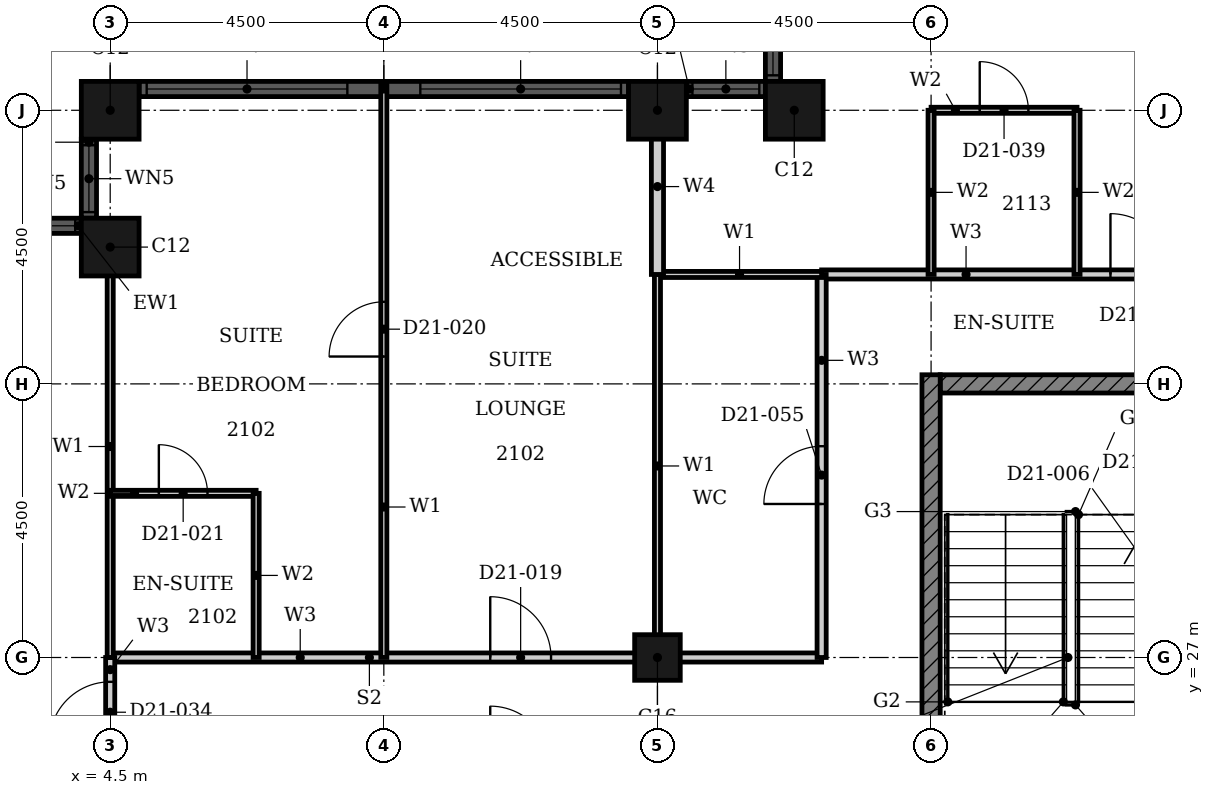
"""IFC4 building model, lengths in metres.
Left out: names, types, materials, properties, quantities, classifications, styles, units other than length and angle.
Written with IfcOpenShell. Run it as: python <this file> out.ifc"""

import sys

from ifc_helpers import new_model, si_unit, direction, frame, frame_2d, origin, origin_2d, place, context, subcontext, project, spatial, rectangle, hollow_rectangle, extrude, element, fill, save


model = new_model("IFC4")
c1 = context("Model", 3, precision=1e-05, world=origin(), true_north=direction((0.0, 1.0)))
c2 = subcontext(c1, "Body", "Model", "MODEL_VIEW")
j1 = project(units=[si_unit("LENGTHUNIT", "METRE"), si_unit("PLANEANGLEUNIT", "RADIAN")], contexts=[c1])
p1 = place(None, origin())
s1 = spatial("IfcSite", under=j1, at=p1, CompositionType="ELEMENT")
p2 = place(p1, origin())
s2 = spatial("IfcBuilding", under=s1, at=p2, CompositionType="ELEMENT")
p3 = place(p2, frame((0.0, 0.0, 88.8)))
s3 = spatial("IfcBuildingStorey", under=s2, at=p3, CompositionType="ELEMENT", Elevation=88.8)
for number, where, z_axis, x_axis in (
    (1, (15.75, 36.0, 0.0), (0.0, 0.0, 1.0), (1.0, 0.0, 0.0)),
    (2, (13.5, 36.0, 0.0), (0.0, 0.0, 1.0), (1.0, 0.0, 0.0)),
    (3, (4.5, 36.0, 0.0), (0.0, 0.0, 1.0), (1.0, 0.0, 0.0)),
    (4, (4.5, 33.75, 0.0), (0.0, 0.0, 1.0), (1.0, 0.0, 0.0)),
):
    element("IfcColumn", number, at=place(p3, frame(where, z_axis=z_axis, x_axis=x_axis)), inside=s3, PredefinedType="COLUMN", context=c2, shape_type="SweptSolid", body=[
        extrude(hollow_rectangle(XDim=0.95, YDim=0.95, WallThickness=0.03, at=origin_2d()), origin(), (0.0, 0.0, 1.0), 3.6),
    ])
p4 = place(p3, frame((13.5, 27.0, 0.0), z_axis=(0.0, 0.0, 1.0), x_axis=(1.0, 0.0, 0.0)))
e5 = element("IfcColumn", 5, at=p4, inside=s3, PredefinedType="COLUMN", context=c2, shape_type="SweptSolid", body=[
    extrude(hollow_rectangle(XDim=0.75, YDim=0.75, WallThickness=0.024, at=origin_2d()), origin(), (0.0, 0.0, 1.0), 3.6),
])
p5 = place(p3, frame((15.4, 37.775, 0.0), z_axis=(0.0, 0.0, 1.0), x_axis=(0.0, -1.0, 0.0)))
e6 = element("IfcWall", 6, at=p5, inside=s3, PredefinedType="SOLIDWALL", context=c2, shape_type="SweptSolid", body=[
    extrude(rectangle(XDim=1.3, YDim=0.25, at=frame_2d((0.65, 0.0))), origin(), (0.0, 0.0, 1.0), 3.6),
])
p6 = place(p5, frame((0.1, 0.0, 0.9)))
e7 = element("IfcOpeningElement", 7, at=p6, cuts=e6, PredefinedType="OPENING", context=c2, shape_type="SweptSolid", body=[
    extrude(rectangle(XDim=1.1, YDim=2.08, at=frame_2d((0.55, 1.04))), frame((0.0, 0.135, 0.0), z_axis=(0.0, -1.0, 0.0), x_axis=(1.0, 0.0, 0.0)), (0.0, 0.0, 1.0), 0.27),
])
p7 = place(p3, frame((15.275, 36.35, 0.0), z_axis=(0.0, 0.0, 1.0), x_axis=(-1.0, 0.0, 0.0)))
e8 = element("IfcWall", 8, at=p7, inside=s3, PredefinedType="SOLIDWALL", context=c2, shape_type="SweptSolid", body=[
    extrude(rectangle(XDim=1.3, YDim=0.25, at=frame_2d((0.65, 0.0))), origin(), (0.0, 0.0, 1.0), 3.6),
])
p8 = place(p7, frame((0.1, 0.0, 0.9)))
e9 = element("IfcOpeningElement", 9, at=p8, cuts=e8, PredefinedType="OPENING", context=c2, shape_type="SweptSolid", body=[
    extrude(rectangle(XDim=1.1, YDim=2.08, at=frame_2d((0.55, 1.04))), frame((0.0, 0.135, 0.0), z_axis=(0.0, -1.0, 0.0), x_axis=(1.0, 0.0, 0.0)), (0.0, 0.0, 1.0), 0.27),
])
p9 = place(p3, frame((13.025, 36.35, 0.0), z_axis=(0.0, 0.0, 1.0), x_axis=(-1.0, 0.0, 0.0)))
e10 = element("IfcWall", 10, at=p9, inside=s3, PredefinedType="SOLIDWALL", context=c2, shape_type="SweptSolid", body=[
    extrude(rectangle(XDim=8.05, YDim=0.25, at=frame_2d((4.025, 0.0))), origin(), (0.0, 0.0, 1.0), 3.6),
])
p10 = place(p9, frame((0.125, 0.0, 0.9)))
e11 = element("IfcOpeningElement", 11, at=p10, cuts=e10, PredefinedType="OPENING", context=c2, shape_type="SweptSolid", body=[
    extrude(rectangle(XDim=3.3, YDim=2.08, at=frame_2d((1.65, 1.04))), frame((0.0, 0.135, 0.0), z_axis=(0.0, -1.0, 0.0), x_axis=(1.0, 0.0, 0.0)), (0.0, 0.0, 1.0), 0.27),
])
p11 = place(p9, frame((4.625, 0.0, 0.9)))
e12 = element("IfcOpeningElement", 12, at=p11, cuts=e10, PredefinedType="OPENING", context=c2, shape_type="SweptSolid", body=[
    extrude(rectangle(XDim=3.3, YDim=2.08, at=frame_2d((1.65, 1.04))), frame((0.0, 0.135, 0.0), z_axis=(0.0, -1.0, 0.0), x_axis=(1.0, 0.0, 0.0)), (0.0, 0.0, 1.0), 0.27),
])
p12 = place(p3, frame((4.15, 35.525, 0.0), z_axis=(0.0, 0.0, 1.0), x_axis=(0.0, -1.0, 0.0)))
e13 = element("IfcWall", 13, at=p12, inside=s3, PredefinedType="SOLIDWALL", context=c2, shape_type="SweptSolid", body=[
    extrude(rectangle(XDim=1.3, YDim=0.25, at=frame_2d((0.65, 0.0))), origin(), (0.0, 0.0, 1.0), 3.6),
])
p13 = place(p12, frame((0.1, 0.0, 0.9)))
e14 = element("IfcOpeningElement", 14, at=p13, cuts=e13, PredefinedType="OPENING", context=c2, shape_type="SweptSolid", body=[
    extrude(rectangle(XDim=1.1, YDim=2.08, at=frame_2d((0.55, 1.04))), frame((0.0, 0.135, 0.0), z_axis=(0.0, -1.0, 0.0), x_axis=(1.0, 0.0, 0.0)), (0.0, 0.0, 1.0), 0.27),
])
p14 = place(p3, frame((4.025, 34.1, 0.0), z_axis=(0.0, 0.0, 1.0), x_axis=(-1.0, 0.0, 0.0)))
e15 = element("IfcWall", 15, at=p14, inside=s3, PredefinedType="SOLIDWALL", context=c2, shape_type="SweptSolid", body=[
    extrude(rectangle(XDim=1.3, YDim=0.25, at=frame_2d((0.65, 0.0))), origin(), (0.0, 0.0, 1.0), 3.6),
])
p15 = place(p14, frame((0.1, 0.0, 0.9)))
e16 = element("IfcOpeningElement", 16, at=p15, cuts=e15, PredefinedType="OPENING", context=c2, shape_type="SweptSolid", body=[
    extrude(rectangle(XDim=1.1, YDim=2.08, at=frame_2d((0.55, 1.04))), frame((0.0, 0.135, 0.0), z_axis=(0.0, -1.0, 0.0), x_axis=(1.0, 0.0, 0.0)), (0.0, 0.0, 1.0), 0.27),
])
p16 = place(p3, frame((18.15, 31.5, 0.0), z_axis=(0.0, 0.0, 1.0), x_axis=(1.0, 0.0, 0.0)))
e17 = element("IfcWall", 17, at=p16, inside=s3, PredefinedType="SHEAR", context=c2, shape_type="SweptSolid", body=[
    extrude(rectangle(XDim=6.797, YDim=0.3, at=frame_2d((3.398, 0.0))), origin(), (0.0, 0.0, 1.0), 3.3),
])
p17 = place(p16, frame((4.736, 0.0, 0.0)))
e18 = element("IfcOpeningElement", 18, at=p17, cuts=e17, PredefinedType="OPENING", context=c2, shape_type="SweptSolid", body=[
    extrude(rectangle(XDim=1.8, YDim=2.1, at=frame_2d((0.9, 1.05))), frame((0.0, 0.16, 0.0), z_axis=(0.0, -1.0, 0.0), x_axis=(1.0, 0.0, 0.0)), (0.0, 0.0, 1.0), 0.32),
])
p18 = place(p3, frame((18.0, 22.35, 0.0), z_axis=(0.0, 0.0, 1.0), x_axis=(0.0, 1.0, 0.0)))
e19 = element("IfcWall", 19, at=p18, inside=s3, PredefinedType="SHEAR", context=c2, shape_type="SweptSolid", body=[
    extrude(rectangle(XDim=9.3, YDim=0.3, at=frame_2d((4.65, 0.0))), origin(), (0.0, 0.0, 1.0), 3.3),
])
p19 = place(p3, frame((4.5, 27.0, 0.0), z_axis=(0.0, 0.0, 1.0), x_axis=(1.0, 0.0, 0.0)))
e20 = element("IfcWall", 20, at=p19, inside=s3, PredefinedType="PARTITIONING", context=c2, shape_type="SweptSolid", body=[
    extrude(rectangle(XDim=11.7, YDim=0.15, at=frame_2d((5.85, 0.0))), origin(), (0.0, 0.0, 1.0), 2.58),
])
p20 = place(p19, frame((6.25, 0.0, 0.0)))
e21 = element("IfcOpeningElement", 21, at=p20, cuts=e20, PredefinedType="OPENING", context=c2, shape_type="SweptSolid", body=[
    extrude(rectangle(XDim=1.0, YDim=2.1, at=frame_2d((0.5, 1.05))), frame((0.0, 0.085, 0.0), z_axis=(0.0, -1.0, 0.0), x_axis=(1.0, 0.0, 0.0)), (0.0, 0.0, 1.0), 0.17),
])
p21 = place(p3, frame((16.2, 33.3, 0.0), z_axis=(0.0, 0.0, 1.0), x_axis=(1.0, 0.0, 0.0)))
e22 = element("IfcWall", 22, at=p21, inside=s3, PredefinedType="PARTITIONING", context=c2, shape_type="SweptSolid", body=[
    extrude(rectangle(XDim=15.3, YDim=0.15, at=frame_2d((7.65, 0.0))), origin(), (0.0, 0.0, 1.0), 3.3),
])
p22 = place(p21, frame((4.75, 0.0, 0.0)))
e23 = element("IfcOpeningElement", 23, at=p22, cuts=e22, PredefinedType="OPENING", context=c2, shape_type="SweptSolid", body=[
    extrude(rectangle(XDim=1.0, YDim=2.1, at=frame_2d((0.5, 1.05))), frame((0.0, 0.085, 0.0), z_axis=(0.0, -1.0, 0.0), x_axis=(1.0, 0.0, 0.0)), (0.0, 0.0, 1.0), 0.17),
])
p23 = place(p21, frame((10.35, 0.0, 0.0)))
e24 = element("IfcOpeningElement", 24, at=p23, cuts=e22, PredefinedType="OPENING", context=c2, shape_type="SweptSolid", body=[
    extrude(rectangle(XDim=0.9, YDim=2.1, at=frame_2d((0.45, 1.05))), frame((0.0, 0.085, 0.0), z_axis=(0.0, -1.0, 0.0), x_axis=(1.0, 0.0, 0.0)), (0.0, 0.0, 1.0), 0.17),
])
p24 = place(p3, frame((16.2, 27.0, 0.0), z_axis=(0.0, 0.0, 1.0), x_axis=(0.0, 1.0, 0.0)))
e25 = element("IfcWall", 25, at=p24, inside=s3, PredefinedType="PARTITIONING", context=c2, shape_type="SweptSolid", body=[
    extrude(rectangle(XDim=6.3, YDim=0.15, at=frame_2d((3.15, 0.0))), origin(), (0.0, 0.0, 1.0), 3.3),
])
p25 = place(p24, frame((2.525, 0.0, 0.0)))
e26 = element("IfcOpeningElement", 26, at=p25, cuts=e25, PredefinedType="OPENING", context=c2, shape_type="SweptSolid", body=[
    extrude(rectangle(XDim=0.95, YDim=2.1, at=frame_2d((0.475, 1.05))), frame((0.0, 0.085, 0.0), z_axis=(0.0, -1.0, 0.0), x_axis=(1.0, 0.0, 0.0)), (0.0, 0.0, 1.0), 0.17),
])
p26 = place(p3, frame((4.5, 25.2, 0.0), z_axis=(0.0, 0.0, 1.0), x_axis=(0.0, 1.0, 0.0)))
e27 = element("IfcWall", 27, at=p26, inside=s3, PredefinedType="PARTITIONING", context=c2, shape_type="SweptSolid", body=[
    extrude(rectangle(XDim=1.8, YDim=0.15, at=frame_2d((0.9, 0.0))), origin(), (0.0, 0.0, 1.0), 3.3),
])
p27 = place(p26, frame((0.4, 0.0, 0.0)))
e28 = element("IfcOpeningElement", 28, at=p27, cuts=e27, PredefinedType="OPENING", context=c2, shape_type="SweptSolid", body=[
    extrude(rectangle(XDim=1.0, YDim=2.1, at=frame_2d((0.5, 1.05))), frame((0.0, 0.085, 0.0), z_axis=(0.0, -1.0, 0.0), x_axis=(1.0, 0.0, 0.0)), (0.0, 0.0, 1.0), 0.17),
])
p28 = place(p3, frame((13.5, 33.3, 0.0), z_axis=(0.0, 0.0, 1.0), x_axis=(1.0, 0.0, 0.0)))
e29 = element("IfcWall", 29, at=p28, inside=s3, PredefinedType="PARTITIONING", context=c2, shape_type="SweptSolid", body=[
    extrude(rectangle(XDim=2.7, YDim=0.1, at=frame_2d((1.35, 0.0))), origin(), (0.0, 0.0, 1.0), 3.3),
])
p29 = place(p3, frame((13.5, 27.0, 0.0), z_axis=(0.0, 0.0, 1.0), x_axis=(0.0, 1.0, 0.0)))
e30 = element("IfcWall", 30, at=p29, inside=s3, PredefinedType="PARTITIONING", context=c2, shape_type="SweptSolid", body=[
    extrude(rectangle(XDim=6.3, YDim=0.1, at=frame_2d((3.15, 0.0))), origin(), (0.0, 0.0, 1.0), 2.38),
])
p30 = place(p3, frame((4.5, 27.0, 0.0), z_axis=(0.0, 0.0, 1.0), x_axis=(0.0, 1.0, 0.0)))
e31 = element("IfcWall", 31, at=p30, inside=s3, PredefinedType="PARTITIONING", context=c2, shape_type="SweptSolid", body=[
    extrude(rectangle(XDim=6.94, YDim=0.1, at=frame_2d((3.47, 0.0))), origin(), (0.0, 0.0, 1.0), 3.3),
])
p31 = place(p3, frame((9.0, 27.0, 0.0), z_axis=(0.0, 0.0, 1.0), x_axis=(0.0, 1.0, 0.0)))
e32 = element("IfcWall", 32, at=p31, inside=s3, PredefinedType="PARTITIONING", context=c2, shape_type="SweptSolid", body=[
    extrude(rectangle(XDim=9.415, YDim=0.1, at=frame_2d((4.708, 0.0))), origin(), (0.0, 0.0, 1.0), 3.3),
])
p32 = place(p31, frame((4.95, 0.0, 0.0)))
e33 = element("IfcOpeningElement", 33, at=p32, cuts=e32, PredefinedType="OPENING", context=c2, shape_type="SweptSolid", body=[
    extrude(rectangle(XDim=0.9, YDim=2.1, at=frame_2d((0.45, 1.05))), frame((0.0, 0.06, 0.0), z_axis=(0.0, -1.0, 0.0), x_axis=(1.0, 0.0, 0.0)), (0.0, 0.0, 1.0), 0.12),
])
p33 = place(p3, frame((13.5, 33.3, 0.0), z_axis=(0.0, 0.0, 1.0), x_axis=(0.0, 1.0, 0.0)))
e34 = element("IfcWall", 34, at=p33, inside=s3, PredefinedType="PARTITIONING", context=c2, shape_type="SweptSolid", body=[
    extrude(rectangle(XDim=2.89, YDim=0.2, at=frame_2d((1.445, 0.0))), origin(), (0.0, 0.0, 1.0), 2.38),
])
p34 = place(p3, frame((4.5, 29.7, 0.0), z_axis=(0.0, 0.0, 1.0), x_axis=(1.0, 0.0, 0.0)))
e35 = element("IfcWall", 35, at=p34, inside=s3, PredefinedType="PARTITIONING", context=c2, shape_type="SweptSolid", body=[
    extrude(rectangle(XDim=2.4, YDim=0.1, at=frame_2d((1.2, 0.0))), origin(), (0.0, 0.0, 1.0), 3.3),
])
p35 = place(p34, frame((0.8, 0.0, 0.0)))
e36 = element("IfcOpeningElement", 36, at=p35, cuts=e35, PredefinedType="OPENING", context=c2, shape_type="SweptSolid", body=[
    extrude(rectangle(XDim=0.8, YDim=2.1, at=frame_2d((0.4, 1.05))), frame((0.0, 0.06, 0.0), z_axis=(0.0, -1.0, 0.0), x_axis=(1.0, 0.0, 0.0)), (0.0, 0.0, 1.0), 0.12),
])
p36 = place(p3, frame((18.0, 36.0, 0.0), z_axis=(0.0, 0.0, 1.0), x_axis=(1.0, 0.0, 0.0)))
e37 = element("IfcWall", 37, at=p36, inside=s3, PredefinedType="PARTITIONING", context=c2, shape_type="SweptSolid", body=[
    extrude(rectangle(XDim=2.4, YDim=0.1, at=frame_2d((1.2, 0.0))), origin(), (0.0, 0.0, 1.0), 3.3),
])
p37 = place(p36, frame((0.8, 0.0, 0.0)))
e38 = element("IfcOpeningElement", 38, at=p37, cuts=e37, PredefinedType="OPENING", context=c2, shape_type="SweptSolid", body=[
    extrude(rectangle(XDim=0.8, YDim=2.1, at=frame_2d((0.4, 1.05))), frame((0.0, 0.06, 0.0), z_axis=(0.0, -1.0, 0.0), x_axis=(1.0, 0.0, 0.0)), (0.0, 0.0, 1.0), 0.12),
])
for number, where, z_axis, x_axis in (
    (39, (18.0, 33.3, 0.0), (0.0, 0.0, 1.0), (0.0, 1.0, 0.0)),
    (40, (20.4, 33.3, 0.0), (0.0, 0.0, 1.0), (0.0, 1.0, 0.0)),
    (41, (6.9, 27.0, 0.0), (0.0, 0.0, 1.0), (0.0, 1.0, 0.0)),
):
    element("IfcWall", number, at=place(p3, frame(where, z_axis=z_axis, x_axis=x_axis)), inside=s3, PredefinedType="PARTITIONING", context=c2, shape_type="SweptSolid", body=[
        extrude(rectangle(XDim=2.7, YDim=0.1, at=frame_2d((1.35, 0.0))), origin(), (0.0, 0.0, 1.0), 3.3),
    ])
p38 = place(p6, origin())
e42 = element("IfcWindow", 42, at=p38, inside=s3, PartitioningType="SINGLE_PANEL", PredefinedType="WINDOW", context=c2, shape_type="SweptSolid", body=[
    extrude(rectangle(XDim=1.1, YDim=2.08, at=frame_2d((0.55, 1.04))), frame((0.0, 0.03, 0.0), z_axis=(0.0, -1.0, 0.0), x_axis=(1.0, 0.0, 0.0)), (0.0, 0.0, 1.0), 0.06),
])
fill(e7, e42)
p39 = place(p8, origin())
e43 = element("IfcWindow", 43, at=p39, inside=s3, PartitioningType="SINGLE_PANEL", PredefinedType="WINDOW", context=c2, shape_type="SweptSolid", body=[
    extrude(rectangle(XDim=1.1, YDim=2.08, at=frame_2d((0.55, 1.04))), frame((0.0, 0.03, 0.0), z_axis=(0.0, -1.0, 0.0), x_axis=(1.0, 0.0, 0.0)), (0.0, 0.0, 1.0), 0.06),
])
fill(e9, e43)
p40 = place(p10, origin())
e44 = element("IfcWindow", 44, at=p40, inside=s3, PartitioningType="SINGLE_PANEL", PredefinedType="WINDOW", context=c2, shape_type="SweptSolid", body=[
    extrude(rectangle(XDim=3.3, YDim=2.08, at=frame_2d((1.65, 1.04))), frame((0.0, 0.03, 0.0), z_axis=(0.0, -1.0, 0.0), x_axis=(1.0, 0.0, 0.0)), (0.0, 0.0, 1.0), 0.06),
])
fill(e11, e44)
p41 = place(p11, origin())
e45 = element("IfcWindow", 45, at=p41, inside=s3, PartitioningType="SINGLE_PANEL", PredefinedType="WINDOW", context=c2, shape_type="SweptSolid", body=[
    extrude(rectangle(XDim=3.3, YDim=2.08, at=frame_2d((1.65, 1.04))), frame((0.0, 0.03, 0.0), z_axis=(0.0, -1.0, 0.0), x_axis=(1.0, 0.0, 0.0)), (0.0, 0.0, 1.0), 0.06),
])
fill(e12, e45)
p42 = place(p13, origin())
e46 = element("IfcWindow", 46, at=p42, inside=s3, PartitioningType="SINGLE_PANEL", PredefinedType="WINDOW", context=c2, shape_type="SweptSolid", body=[
    extrude(rectangle(XDim=1.1, YDim=2.08, at=frame_2d((0.55, 1.04))), frame((0.0, 0.03, 0.0), z_axis=(0.0, -1.0, 0.0), x_axis=(1.0, 0.0, 0.0)), (0.0, 0.0, 1.0), 0.06),
])
fill(e14, e46)
p43 = place(p15, origin())
e47 = element("IfcWindow", 47, at=p43, inside=s3, PartitioningType="SINGLE_PANEL", PredefinedType="WINDOW", context=c2, shape_type="SweptSolid", body=[
    extrude(rectangle(XDim=1.1, YDim=2.08, at=frame_2d((0.55, 1.04))), frame((0.0, 0.03, 0.0), z_axis=(0.0, -1.0, 0.0), x_axis=(1.0, 0.0, 0.0)), (0.0, 0.0, 1.0), 0.06),
])
fill(e16, e47)
p44 = place(p20, origin())
e48 = element("IfcDoor", 48, at=p44, inside=s3, OperationType="SINGLE_SWING_LEFT", PredefinedType="DOOR", context=c2, shape_type="SweptSolid", body=[
    extrude(rectangle(XDim=1.0, YDim=2.1, at=frame_2d((0.5, 1.05))), frame((0.0, 0.025, 0.0), z_axis=(0.0, -1.0, 0.0), x_axis=(1.0, 0.0, 0.0)), (0.0, 0.0, 1.0), 0.05),
])
fill(e21, e48)
p45 = place(p32, origin())
e49 = element("IfcDoor", 49, at=p45, inside=s3, OperationType="SINGLE_SWING_RIGHT", PredefinedType="DOOR", context=c2, shape_type="SweptSolid", body=[
    extrude(rectangle(XDim=0.9, YDim=2.1, at=frame_2d((0.45, 1.05))), frame((0.0, 0.025, 0.0), z_axis=(0.0, -1.0, 0.0), x_axis=(1.0, 0.0, 0.0)), (0.0, 0.0, 1.0), 0.05),
])
fill(e33, e49)
p46 = place(p35, origin())
e50 = element("IfcDoor", 50, at=p46, inside=s3, OperationType="SINGLE_SWING_RIGHT", PredefinedType="DOOR", context=c2, shape_type="SweptSolid", body=[
    extrude(rectangle(XDim=0.8, YDim=2.1, at=frame_2d((0.4, 1.05))), frame((0.0, 0.025, 0.0), z_axis=(0.0, -1.0, 0.0), x_axis=(1.0, 0.0, 0.0)), (0.0, 0.0, 1.0), 0.05),
])
fill(e36, e50)
p47 = place(p27, origin())
e51 = element("IfcDoor", 51, at=p47, inside=s3, OperationType="SINGLE_SWING_LEFT", PredefinedType="DOOR", context=c2, shape_type="SweptSolid", body=[
    extrude(rectangle(XDim=1.0, YDim=2.1, at=frame_2d((0.5, 1.05))), frame((0.0, 0.025, 0.0), z_axis=(0.0, -1.0, 0.0), x_axis=(1.0, 0.0, 0.0)), (0.0, 0.0, 1.0), 0.05),
])
fill(e28, e51)
p48 = place(p22, origin())
e52 = element("IfcDoor", 52, at=p48, inside=s3, OperationType="SINGLE_SWING_RIGHT", PredefinedType="DOOR", context=c2, shape_type="SweptSolid", body=[
    extrude(rectangle(XDim=1.0, YDim=2.1, at=frame_2d((0.5, 1.05))), frame((0.0, 0.025, 0.0), z_axis=(0.0, -1.0, 0.0), x_axis=(1.0, 0.0, 0.0)), (0.0, 0.0, 1.0), 0.05),
])
fill(e23, e52)
p49 = place(p37, origin())
e53 = element("IfcDoor", 53, at=p49, inside=s3, OperationType="SINGLE_SWING_RIGHT", PredefinedType="DOOR", context=c2, shape_type="SweptSolid", body=[
    extrude(rectangle(XDim=0.8, YDim=2.1, at=frame_2d((0.4, 1.05))), frame((0.0, 0.025, 0.0), z_axis=(0.0, -1.0, 0.0), x_axis=(1.0, 0.0, 0.0)), (0.0, 0.0, 1.0), 0.05),
])
fill(e38, e53)
p50 = place(p25, origin())
e54 = element("IfcDoor", 54, at=p50, inside=s3, OperationType="SINGLE_SWING_LEFT", PredefinedType="DOOR", context=c2, shape_type="SweptSolid", body=[
    extrude(rectangle(XDim=0.95, YDim=2.1, at=frame_2d((0.475, 1.05))), frame((0.0, 0.025, 0.0), z_axis=(0.0, -1.0, 0.0), x_axis=(1.0, 0.0, 0.0)), (0.0, 0.0, 1.0), 0.05),
])
fill(e26, e54)
save(model, sys.argv[1])
